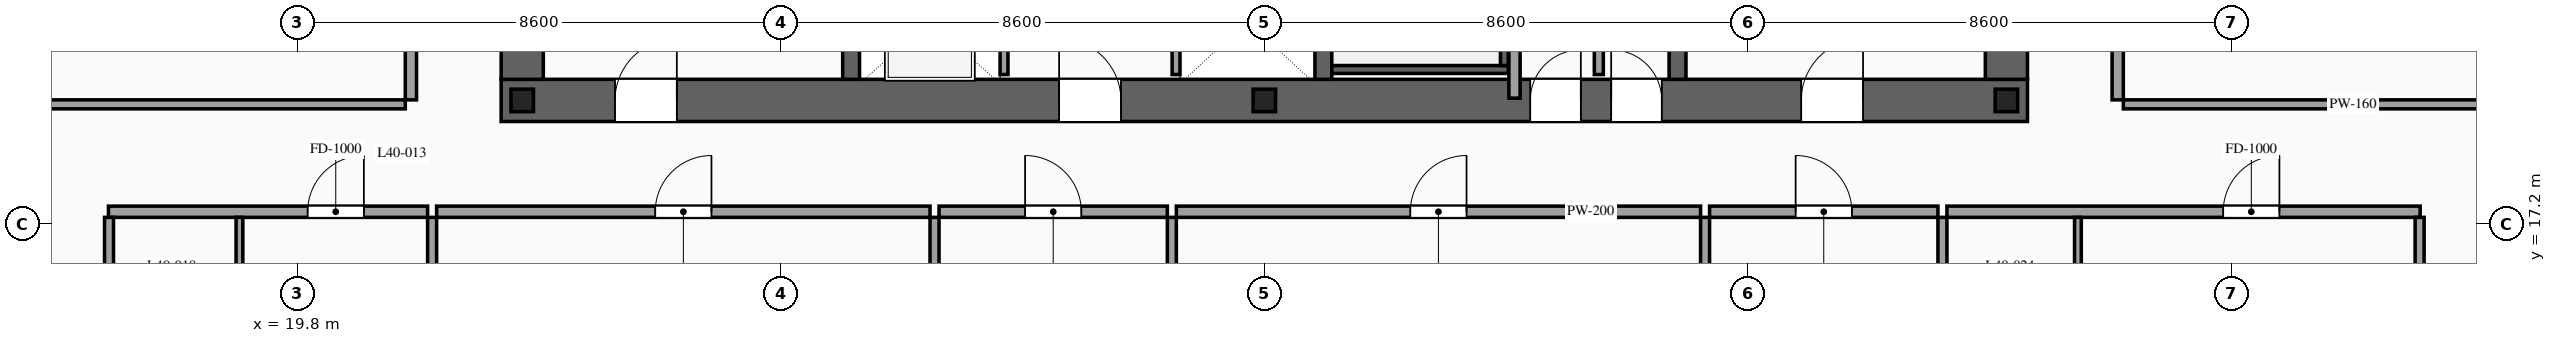
"""IFC4 building model, lengths in metres.
Left out: names, types, materials, properties, quantities, classifications, styles, units other than length and angle.
Written with IfcOpenShell. Run it as: python <this file> out.ifc"""

import sys

from ifc_helpers import new_model, si_unit, direction, frame, frame_2d, origin, origin_2d, place, context, subcontext, project, spatial, rectangle, i_section, extrude, source, transform, mapped, element, fill, save


model = new_model("IFC4")
c1 = context("Model", 3, precision=1e-05, world=origin(), true_north=direction((0.0, 1.0)))
c2 = subcontext(c1, "Body", "Model", "MODEL_VIEW")
j1 = project(units=[si_unit("LENGTHUNIT", "METRE"), si_unit("PLANEANGLEUNIT", "RADIAN")], contexts=[c1])
p1 = place(None, origin())
s1 = spatial("IfcSite", under=j1, at=p1, CompositionType="ELEMENT")
p2 = place(p1, origin())
s2 = spatial("IfcBuilding", under=s1, at=p2, CompositionType="ELEMENT")
p3 = place(p2, frame((0.0, 0.0, 152.4)))
s3 = spatial("IfcBuildingStorey", under=s2, at=p3, CompositionType="ELEMENT", Elevation=152.4)
p4 = place(p3, frame((23.425, 19.4, 0.0), z_axis=(0.0, 0.0, 1.0), x_axis=(1.0, 0.0, 0.0)))
e1 = element("IfcWall", 1, at=p4, inside=s3, PredefinedType="SHEAR", context=c2, shape_type="SweptSolid", body=[
    extrude(rectangle(XDim=27.15, YDim=0.75, at=frame_2d((13.575, 0.0))), origin(), (0.0, 0.0, 1.0), 3.6),
])
p5 = place(p4, frame((2.025, 0.0, 0.0)))
e2 = element("IfcOpeningElement", 2, at=p5, cuts=e1, PredefinedType="OPENING", context=c2, shape_type="SweptSolid", body=[
    extrude(rectangle(XDim=1.1, YDim=2.2, at=frame_2d((0.55, 1.1))), frame((0.0, 0.39, 0.0), z_axis=(0.0, -1.0, 0.0), x_axis=(1.0, 0.0, 0.0)), (0.0, 0.0, 1.0), 0.78),
])
p6 = place(p4, frame((9.925, 0.0, 0.0)))
e3 = element("IfcOpeningElement", 3, at=p6, cuts=e1, PredefinedType="OPENING", context=c2, shape_type="SweptSolid", body=[
    extrude(rectangle(XDim=1.1, YDim=2.2, at=frame_2d((0.55, 1.1))), frame((0.0, 0.39, 0.0), z_axis=(0.0, -1.0, 0.0), x_axis=(1.0, 0.0, 0.0)), (0.0, 0.0, 1.0), 0.78),
])
p7 = place(p4, frame((23.125, 0.0, 0.0)))
e4 = element("IfcOpeningElement", 4, at=p7, cuts=e1, PredefinedType="OPENING", context=c2, shape_type="SweptSolid", body=[
    extrude(rectangle(XDim=1.1, YDim=2.2, at=frame_2d((0.55, 1.1))), frame((0.0, 0.39, 0.0), z_axis=(0.0, -1.0, 0.0), x_axis=(1.0, 0.0, 0.0)), (0.0, 0.0, 1.0), 0.78),
])
p8 = place(p4, frame((19.745, 0.0, 0.0)))
e5 = element("IfcOpeningElement", 5, at=p8, cuts=e1, PredefinedType="OPENING", context=c2, shape_type="SweptSolid", body=[
    extrude(rectangle(XDim=0.9, YDim=2.15, at=frame_2d((0.45, 1.075))), frame((0.0, 0.39, 0.0), z_axis=(0.0, -1.0, 0.0), x_axis=(1.0, 0.0, 0.0)), (0.0, 0.0, 1.0), 0.78),
])
p9 = place(p4, frame((18.305, 0.0, 0.0)))
e6 = element("IfcOpeningElement", 6, at=p9, cuts=e1, PredefinedType="OPENING", context=c2, shape_type="SweptSolid", body=[
    extrude(rectangle(XDim=0.9, YDim=2.15, at=frame_2d((0.45, 1.075))), frame((0.0, 0.39, 0.0), z_axis=(0.0, -1.0, 0.0), x_axis=(1.0, 0.0, 0.0)), (0.0, 0.0, 1.0), 0.78),
])
m1 = source(origin(), c2, "Body", "SweptSolid", [
    extrude(rectangle(XDim=12.05, YDim=0.75, at=frame_2d((6.025, 0.0))), origin(), (0.0, 0.0, 1.0), 3.6),
])
for number, where, z_axis, x_axis in (
    (7, (23.8, 19.775, 0.0), (0.0, 0.0, 1.0), (0.0, 1.0, 0.0)),
    (8, (50.2, 19.775, 0.0), (0.0, 0.0, 1.0), (0.0, 1.0, 0.0)),
):
    element("IfcWall", number, at=place(p3, frame(where, z_axis=z_axis, x_axis=x_axis)), inside=s3, PredefinedType="SHEAR", context=c2, shape_type="MappedRepresentation", body=[
        mapped(m1, transform((0.0, 0.0, 0.0), scale=1.0)),
    ])
m2 = source(origin(), c2, "Body", "SweptSolid", [
    extrude(rectangle(XDim=12.05, YDim=0.3, at=frame_2d((6.025, 0.0))), origin(), (0.0, 0.0, 1.0), 3.6),
])
for number, where, z_axis, x_axis in (
    (9, (29.65, 19.775, 0.0), (0.0, 0.0, 1.0), (0.0, 1.0, 0.0)),
    (10, (38.05, 19.775, 0.0), (0.0, 0.0, 1.0), (0.0, 1.0, 0.0)),
    (11, (44.35, 19.775, 0.0), (0.0, 0.0, 1.0), (0.0, 1.0, 0.0)),
):
    element("IfcWall", number, at=place(p3, frame(where, z_axis=z_axis, x_axis=x_axis)), inside=s3, PredefinedType="SOLIDWALL", context=c2, shape_type="MappedRepresentation", body=[
        mapped(m2, transform((0.0, 0.0, 0.0), scale=1.0)),
    ])
m3 = source(origin(), c2, "Body", "SweptSolid", [
    extrude(i_section(OverallWidth=0.4, OverallDepth=0.4, WebThickness=0.013, FlangeThickness=0.021, at=origin_2d()), origin(), (0.0, 0.0, 1.0), 3.6),
])
for number, where, z_axis, x_axis in (
    (12, (23.8, 19.4, 0.0), (0.0, 0.0, 1.0), (1.0, 0.0, 0.0)),
    (13, (37.0, 19.4, 0.0), (0.0, 0.0, 1.0), (1.0, 0.0, 0.0)),
    (14, (50.2, 19.4, 0.0), (0.0, 0.0, 1.0), (1.0, 0.0, 0.0)),
):
    element("IfcColumn", number, at=place(p3, frame(where, z_axis=z_axis, x_axis=x_axis)), inside=s3, PredefinedType="COLUMN", context=c2, shape_type="MappedRepresentation", body=[
        mapped(m3, transform((0.0, 0.0, 0.0), scale=1.0)),
    ])
p10 = place(p3, frame((32.37, 19.86, 0.0), z_axis=(0.0, 0.0, 1.0), x_axis=(0.0, 1.0, 0.0)))
e15 = element("IfcWall", 15, at=p10, inside=s3, PredefinedType="SOLIDWALL", context=c2, shape_type="SweptSolid", body=[
    extrude(rectangle(XDim=2.04, YDim=0.14, at=frame_2d((1.02, 0.0))), origin(), (0.0, 0.0, 1.0), 3.38),
])
p11 = place(p10, frame((0.47, 0.0, 0.0)))
e16 = element("IfcOpeningElement", 16, at=p11, cuts=e15, PredefinedType="OPENING", context=c2, shape_type="SweptSolid", body=[
    extrude(rectangle(XDim=1.1, YDim=2.2, at=frame_2d((0.55, 1.1))), frame((0.0, 0.085, 0.0), z_axis=(0.0, -1.0, 0.0), x_axis=(1.0, 0.0, 0.0)), (0.0, 0.0, 1.0), 0.17),
])
m4 = source(origin(), c2, "Body", "SweptSolid", [
    extrude(rectangle(XDim=2.04, YDim=0.14, at=frame_2d((1.02, 0.0))), origin(), (0.0, 0.0, 1.0), 3.38),
])
p12 = place(p3, frame((35.43, 19.86, 0.0), z_axis=(0.0, 0.0, 1.0), x_axis=(0.0, 1.0, 0.0)))
e17 = element("IfcWall", 17, at=p12, inside=s3, PredefinedType="SOLIDWALL", context=c2, shape_type="MappedRepresentation", body=[
    mapped(m4, transform((0.0, 0.0, 0.0), scale=1.0)),
])
m5 = source(origin(), c2, "Body", "SweptSolid", [
    extrude(rectangle(XDim=3.14, YDim=0.14, at=frame_2d((1.57, 0.0))), origin(), (0.0, 0.0, 1.0), 3.38),
])
p13 = place(p3, frame((38.2, 19.95, 0.0), z_axis=(0.0, 0.0, 1.0), x_axis=(1.0, 0.0, 0.0)))
e18 = element("IfcWall", 18, at=p13, inside=s3, PredefinedType="SOLIDWALL", context=c2, shape_type="MappedRepresentation", body=[
    mapped(m5, transform((0.0, 0.0, 0.0), scale=1.0)),
])
m6 = source(origin(), c2, "Body", "SweptSolid", [
    extrude(rectangle(XDim=8.94, YDim=0.14, at=frame_2d((4.47, 0.0))), origin(), (0.0, 0.0, 1.0), 3.38),
])
p14 = place(p3, frame((41.27, 20.02, 0.0), z_axis=(0.0, 0.0, 1.0), x_axis=(0.0, 1.0, 0.0)))
e19 = element("IfcWall", 19, at=p14, inside=s3, PredefinedType="SOLIDWALL", context=c2, shape_type="MappedRepresentation", body=[
    mapped(m6, transform((0.0, 0.0, 0.0), scale=1.0)),
])
m7 = source(origin(), c2, "Body", "SweptSolid", [
    extrude(rectangle(XDim=1.34, YDim=0.16, at=frame_2d((0.67, 0.0))), origin(), (0.0, 0.0, 1.0), 3.38),
])
p15 = place(p3, frame((42.95, 19.86, 0.0), z_axis=(0.0, 0.0, 1.0), x_axis=(0.0, 1.0, 0.0)))
e20 = element("IfcWall", 20, at=p15, inside=s3, PredefinedType="PARTITIONING", context=c2, shape_type="MappedRepresentation", body=[
    mapped(m7, transform((0.0, 0.0, 0.0), scale=1.0)),
])
m8 = source(origin(), c2, "Body", "SweptSolid", [
    extrude(rectangle(XDim=12.72, YDim=0.2, at=frame_2d((6.36, 0.0))), origin(), (0.0, 0.0, 1.0), 3.38),
])
p16 = place(p3, frame((41.45, 19.44, 0.0), z_axis=(0.0, 0.0, 1.0), x_axis=(0.0, 1.0, 0.0)))
e21 = element("IfcWall", 21, at=p16, inside=s3, PredefinedType="PARTITIONING", context=c2, shape_type="MappedRepresentation", body=[
    mapped(m8, transform((0.0, 0.0, 0.0), scale=1.0)),
])
p17 = place(p3, frame((16.44, 17.42, 0.0), z_axis=(0.0, 0.0, 1.0), x_axis=(1.0, 0.0, 0.0)))
e22 = element("IfcWall", 22, at=p17, inside=s3, PredefinedType="PARTITIONING", context=c2, shape_type="SweptSolid", body=[
    extrude(rectangle(XDim=5.677, YDim=0.2, at=frame_2d((2.838, 0.0))), origin(), (0.0, 0.0, 1.0), 3.38),
])
p18 = place(p17, frame((3.543, 0.0, 0.0)))
e23 = element("IfcOpeningElement", 23, at=p18, cuts=e22, PredefinedType="OPENING", context=c2, shape_type="SweptSolid", body=[
    extrude(rectangle(XDim=1.0, YDim=2.2, at=frame_2d((0.5, 1.1))), frame((0.0, 0.115, 0.0), z_axis=(0.0, -1.0, 0.0), x_axis=(1.0, 0.0, 0.0)), (0.0, 0.0, 1.0), 0.23),
])
m9 = source(origin(), c2, "Body", "SweptSolid", [
    extrude(rectangle(XDim=14.97, YDim=0.16, at=frame_2d((7.485, 0.0))), origin(), (0.0, 0.0, 1.0), 3.38),
])
p19 = place(p3, frame((22.197, 2.35, 0.0), z_axis=(0.0, 0.0, 1.0), x_axis=(0.0, 1.0, 0.0)))
e24 = element("IfcWall", 24, at=p19, inside=s3, PredefinedType="PARTITIONING", context=c2, shape_type="MappedRepresentation", body=[
    mapped(m9, transform((0.0, 0.0, 0.0), scale=1.0)),
])
m10 = source(origin(), c2, "Body", "SweptSolid", [
    extrude(rectangle(XDim=2.42, YDim=0.12, at=frame_2d((1.21, 0.0))), origin(), (0.0, 0.0, 1.0), 3.38),
])
p20 = place(p3, frame((18.77, 14.9, 0.0), z_axis=(0.0, 0.0, 1.0), x_axis=(0.0, 1.0, 0.0)))
e25 = element("IfcWall", 25, at=p20, inside=s3, PredefinedType="PARTITIONING", context=c2, shape_type="MappedRepresentation", body=[
    mapped(m10, transform((0.0, 0.0, 0.0), scale=1.0)),
])
p21 = place(p3, frame((22.277, 17.42, 0.0), z_axis=(0.0, 0.0, 1.0), x_axis=(1.0, 0.0, 0.0)))
e26 = element("IfcWall", 26, at=p21, inside=s3, PredefinedType="PARTITIONING", context=c2, shape_type="SweptSolid", body=[
    extrude(rectangle(XDim=8.777, YDim=0.2, at=frame_2d((4.388, 0.0))), origin(), (0.0, 0.0, 1.0), 3.38),
])
p22 = place(p21, frame((3.889, 0.0, 0.0)))
e27 = element("IfcOpeningElement", 27, at=p22, cuts=e26, PredefinedType="OPENING", context=c2, shape_type="SweptSolid", body=[
    extrude(rectangle(XDim=1.0, YDim=2.2, at=frame_2d((0.5, 1.1))), frame((0.0, 0.115, 0.0), z_axis=(0.0, -1.0, 0.0), x_axis=(1.0, 0.0, 0.0)), (0.0, 0.0, 1.0), 0.23),
])
p23 = place(p3, frame((31.134, 2.35, 0.0), z_axis=(0.0, 0.0, 1.0), x_axis=(0.0, 1.0, 0.0)))
e28 = element("IfcWall", 28, at=p23, inside=s3, PredefinedType="PARTITIONING", context=c2, shape_type="MappedRepresentation", body=[
    mapped(m9, transform((0.0, 0.0, 0.0), scale=1.0)),
])
p24 = place(p3, frame((31.214, 17.42, 0.0), z_axis=(0.0, 0.0, 1.0), x_axis=(1.0, 0.0, 0.0)))
e29 = element("IfcWall", 29, at=p24, inside=s3, PredefinedType="PARTITIONING", context=c2, shape_type="SweptSolid", body=[
    extrude(rectangle(XDim=4.061, YDim=0.2, at=frame_2d((2.03, 0.0))), origin(), (0.0, 0.0, 1.0), 3.38),
])
p25 = place(p24, frame((1.531, 0.0, 0.0)))
e30 = element("IfcOpeningElement", 30, at=p25, cuts=e29, PredefinedType="OPENING", context=c2, shape_type="SweptSolid", body=[
    extrude(rectangle(XDim=1.0, YDim=2.2, at=frame_2d((0.5, 1.1))), frame((0.0, 0.115, 0.0), z_axis=(0.0, -1.0, 0.0), x_axis=(1.0, 0.0, 0.0)), (0.0, 0.0, 1.0), 0.23),
])
p26 = place(p3, frame((35.355, 2.35, 0.0), z_axis=(0.0, 0.0, 1.0), x_axis=(0.0, 1.0, 0.0)))
e31 = element("IfcWall", 31, at=p26, inside=s3, PredefinedType="PARTITIONING", context=c2, shape_type="MappedRepresentation", body=[
    mapped(m9, transform((0.0, 0.0, 0.0), scale=1.0)),
])
p27 = place(p3, frame((35.435, 17.42, 0.0), z_axis=(0.0, 0.0, 1.0), x_axis=(1.0, 0.0, 0.0)))
e32 = element("IfcWall", 32, at=p27, inside=s3, PredefinedType="PARTITIONING", context=c2, shape_type="SweptSolid", body=[
    extrude(rectangle(XDim=9.325, YDim=0.2, at=frame_2d((4.663, 0.0))), origin(), (0.0, 0.0, 1.0), 3.38),
])
p28 = place(p27, frame((4.162, 0.0, 0.0)))
e33 = element("IfcOpeningElement", 33, at=p28, cuts=e32, PredefinedType="OPENING", context=c2, shape_type="SweptSolid", body=[
    extrude(rectangle(XDim=1.0, YDim=2.2, at=frame_2d((0.5, 1.1))), frame((0.0, 0.115, 0.0), z_axis=(0.0, -1.0, 0.0), x_axis=(1.0, 0.0, 0.0)), (0.0, 0.0, 1.0), 0.23),
])
p29 = place(p3, frame((44.84, 2.35, 0.0), z_axis=(0.0, 0.0, 1.0), x_axis=(0.0, 1.0, 0.0)))
e34 = element("IfcWall", 34, at=p29, inside=s3, PredefinedType="PARTITIONING", context=c2, shape_type="MappedRepresentation", body=[
    mapped(m9, transform((0.0, 0.0, 0.0), scale=1.0)),
])
p30 = place(p3, frame((44.92, 17.42, 0.0), z_axis=(0.0, 0.0, 1.0), x_axis=(1.0, 0.0, 0.0)))
e35 = element("IfcWall", 35, at=p30, inside=s3, PredefinedType="PARTITIONING", context=c2, shape_type="SweptSolid", body=[
    extrude(rectangle(XDim=4.062, YDim=0.2, at=frame_2d((2.031, 0.0))), origin(), (0.0, 0.0, 1.0), 3.38),
])
p31 = place(p30, frame((1.531, 0.0, 0.0)))
e36 = element("IfcOpeningElement", 36, at=p31, cuts=e35, PredefinedType="OPENING", context=c2, shape_type="SweptSolid", body=[
    extrude(rectangle(XDim=1.0, YDim=2.2, at=frame_2d((0.5, 1.1))), frame((0.0, 0.115, 0.0), z_axis=(0.0, -1.0, 0.0), x_axis=(1.0, 0.0, 0.0)), (0.0, 0.0, 1.0), 0.23),
])
p32 = place(p3, frame((49.062, 2.35, 0.0), z_axis=(0.0, 0.0, 1.0), x_axis=(0.0, 1.0, 0.0)))
e37 = element("IfcWall", 37, at=p32, inside=s3, PredefinedType="PARTITIONING", context=c2, shape_type="MappedRepresentation", body=[
    mapped(m9, transform((0.0, 0.0, 0.0), scale=1.0)),
])
p33 = place(p3, frame((49.142, 17.42, 0.0), z_axis=(0.0, 0.0, 1.0), x_axis=(1.0, 0.0, 0.0)))
e38 = element("IfcWall", 38, at=p33, inside=s3, PredefinedType="PARTITIONING", context=c2, shape_type="SweptSolid", body=[
    extrude(rectangle(XDim=8.418, YDim=0.2, at=frame_2d((4.209, 0.0))), origin(), (0.0, 0.0, 1.0), 3.38),
])
p34 = place(p33, frame((4.914, 0.0, 0.0)))
e39 = element("IfcOpeningElement", 39, at=p34, cuts=e38, PredefinedType="OPENING", context=c2, shape_type="SweptSolid", body=[
    extrude(rectangle(XDim=1.0, YDim=2.2, at=frame_2d((0.5, 1.1))), frame((0.0, 0.115, 0.0), z_axis=(0.0, -1.0, 0.0), x_axis=(1.0, 0.0, 0.0)), (0.0, 0.0, 1.0), 0.23),
])
m11 = source(origin(), c2, "Body", "SweptSolid", [
    extrude(rectangle(XDim=14.82, YDim=0.16, at=frame_2d((7.41, 0.0))), origin(), (0.0, 0.0, 1.0), 3.38),
])
for number, where, z_axis, x_axis in (
    (40, (16.45, 2.5, 0.0), (0.0, 0.0, 1.0), (0.0, 1.0, 0.0)),
    (41, (57.55, 2.5, 0.0), (0.0, 0.0, 1.0), (0.0, 1.0, 0.0)),
):
    element("IfcWall", number, at=place(p3, frame(where, z_axis=z_axis, x_axis=x_axis)), inside=s3, PredefinedType="PARTITIONING", context=c2, shape_type="MappedRepresentation", body=[
        mapped(m11, transform((0.0, 0.0, 0.0), scale=1.0)),
    ])
p35 = place(p3, frame((51.472, 14.9, 0.0), z_axis=(0.0, 0.0, 1.0), x_axis=(0.0, 1.0, 0.0)))
e42 = element("IfcWall", 42, at=p35, inside=s3, PredefinedType="PARTITIONING", context=c2, shape_type="MappedRepresentation", body=[
    mapped(m10, transform((0.0, 0.0, 0.0), scale=1.0)),
])
p36 = place(p3, frame((21.82, 19.41, 0.0), z_axis=(0.0, 0.0, 1.0), x_axis=(0.0, 1.0, 0.0)))
e43 = element("IfcWall", 43, at=p36, inside=s3, PredefinedType="PARTITIONING", context=c2, shape_type="SweptSolid", body=[
    extrude(rectangle(XDim=6.31, YDim=0.2, at=frame_2d((3.155, 0.0))), origin(), (0.0, 0.0, 1.0), 3.38),
])
p37 = place(p36, frame((2.655, 0.0, 0.0)))
e44 = element("IfcOpeningElement", 44, at=p37, cuts=e43, PredefinedType="OPENING", context=c2, shape_type="SweptSolid", body=[
    extrude(rectangle(XDim=1.0, YDim=2.2, at=frame_2d((0.5, 1.1))), frame((0.0, 0.115, 0.0), z_axis=(0.0, -1.0, 0.0), x_axis=(1.0, 0.0, 0.0)), (0.0, 0.0, 1.0), 0.23),
])
m12 = source(origin(), c2, "Body", "SweptSolid", [
    extrude(rectangle(XDim=8.17, YDim=0.16, at=frame_2d((4.085, 0.0))), origin(), (0.0, 0.0, 1.0), 2.875),
])
p38 = place(p3, frame((13.55, 19.33, 0.0), z_axis=(0.0, 0.0, 1.0), x_axis=(1.0, 0.0, 0.0)))
e45 = element("IfcWall", 45, at=p38, inside=s3, PredefinedType="PARTITIONING", context=c2, shape_type="MappedRepresentation", body=[
    mapped(m12, transform((0.0, 0.0, 0.0), scale=1.0)),
])
p39 = place(p3, frame((52.18, 19.41, 0.0), z_axis=(0.0, 0.0, 1.0), x_axis=(0.0, 1.0, 0.0)))
e46 = element("IfcWall", 46, at=p39, inside=s3, PredefinedType="PARTITIONING", context=c2, shape_type="SweptSolid", body=[
    extrude(rectangle(XDim=6.31, YDim=0.2, at=frame_2d((3.155, 0.0))), origin(), (0.0, 0.0, 1.0), 3.38),
])
p40 = place(p39, frame((2.655, 0.0, 0.0)))
e47 = element("IfcOpeningElement", 47, at=p40, cuts=e46, PredefinedType="OPENING", context=c2, shape_type="SweptSolid", body=[
    extrude(rectangle(XDim=1.0, YDim=2.2, at=frame_2d((0.5, 1.1))), frame((0.0, 0.115, 0.0), z_axis=(0.0, -1.0, 0.0), x_axis=(1.0, 0.0, 0.0)), (0.0, 0.0, 1.0), 0.23),
])
p41 = place(p3, frame((52.28, 19.33, 0.0), z_axis=(0.0, 0.0, 1.0), x_axis=(1.0, 0.0, 0.0)))
e48 = element("IfcWall", 48, at=p41, inside=s3, PredefinedType="PARTITIONING", context=c2, shape_type="MappedRepresentation", body=[
    mapped(m12, transform((0.0, 0.0, 0.0), scale=1.0)),
])
m13 = source(origin(), c2, "Body", "SweptSolid", [
    extrude(rectangle(XDim=1.1, YDim=2.2, at=frame_2d((0.55, 1.1))), frame((0.0, 0.025, 0.0), z_axis=(0.0, -1.0, 0.0), x_axis=(1.0, 0.0, 0.0)), (0.0, 0.0, 1.0), 0.05),
])
p42 = place(p5, origin())
e49 = element("IfcDoor", 49, at=p42, inside=s3, OperationType="SINGLE_SWING_RIGHT", PredefinedType="DOOR", context=c2, shape_type="MappedRepresentation", body=[
    mapped(m13, transform((0.0, 0.0, 0.0), scale=1.0)),
])
fill(e2, e49)
p43 = place(p6, origin())
e50 = element("IfcDoor", 50, at=p43, inside=s3, OperationType="SINGLE_SWING_LEFT", PredefinedType="DOOR", context=c2, shape_type="MappedRepresentation", body=[
    mapped(m13, transform((0.0, 0.0, 0.0), scale=1.0)),
])
fill(e3, e50)
p44 = place(p7, origin())
e51 = element("IfcDoor", 51, at=p44, inside=s3, OperationType="SINGLE_SWING_RIGHT", PredefinedType="DOOR", context=c2, shape_type="MappedRepresentation", body=[
    mapped(m13, transform((0.0, 0.0, 0.0), scale=1.0)),
])
fill(e4, e51)
m14 = source(origin(), c2, "Body", "SweptSolid", [
    extrude(rectangle(XDim=0.9, YDim=2.15, at=frame_2d((0.45, 1.075))), frame((0.0, 0.025, 0.0), z_axis=(0.0, -1.0, 0.0), x_axis=(1.0, 0.0, 0.0)), (0.0, 0.0, 1.0), 0.05),
])
p45 = place(p8, origin())
e52 = element("IfcDoor", 52, at=p45, inside=s3, OperationType="SINGLE_SWING_LEFT", PredefinedType="DOOR", context=c2, shape_type="MappedRepresentation", body=[
    mapped(m14, transform((0.0, 0.0, 0.0), scale=1.0)),
])
fill(e5, e52)
p46 = place(p9, origin())
e53 = element("IfcDoor", 53, at=p46, inside=s3, OperationType="SINGLE_SWING_RIGHT", PredefinedType="DOOR", context=c2, shape_type="MappedRepresentation", body=[
    mapped(m14, transform((0.0, 0.0, 0.0), scale=1.0)),
])
fill(e6, e53)
m15 = source(origin(), c2, "Body", "SweptSolid", [
    extrude(rectangle(XDim=1.0, YDim=2.2, at=frame_2d((0.5, 1.1))), frame((0.0, 0.025, 0.0), z_axis=(0.0, -1.0, 0.0), x_axis=(1.0, 0.0, 0.0)), (0.0, 0.0, 1.0), 0.05),
])
p47 = place(p18, origin())
e54 = element("IfcDoor", 54, at=p47, inside=s3, OperationType="SINGLE_SWING_RIGHT", PredefinedType="DOOR", context=c2, shape_type="MappedRepresentation", body=[
    mapped(m15, transform((0.0, 0.0, 0.0), scale=1.0)),
])
fill(e23, e54)
p48 = place(p22, origin())
e55 = element("IfcDoor", 55, at=p48, inside=s3, OperationType="SINGLE_SWING_RIGHT", PredefinedType="DOOR", context=c2, shape_type="MappedRepresentation", body=[
    mapped(m15, transform((0.0, 0.0, 0.0), scale=1.0)),
])
fill(e27, e55)
p49 = place(p25, origin())
e56 = element("IfcDoor", 56, at=p49, inside=s3, OperationType="SINGLE_SWING_LEFT", PredefinedType="DOOR", context=c2, shape_type="MappedRepresentation", body=[
    mapped(m15, transform((0.0, 0.0, 0.0), scale=1.0)),
])
fill(e30, e56)
p50 = place(p28, origin())
e57 = element("IfcDoor", 57, at=p50, inside=s3, OperationType="SINGLE_SWING_RIGHT", PredefinedType="DOOR", context=c2, shape_type="MappedRepresentation", body=[
    mapped(m15, transform((0.0, 0.0, 0.0), scale=1.0)),
])
fill(e33, e57)
p51 = place(p31, origin())
e58 = element("IfcDoor", 58, at=p51, inside=s3, OperationType="SINGLE_SWING_LEFT", PredefinedType="DOOR", context=c2, shape_type="MappedRepresentation", body=[
    mapped(m15, transform((0.0, 0.0, 0.0), scale=1.0)),
])
fill(e36, e58)
p52 = place(p34, origin())
e59 = element("IfcDoor", 59, at=p52, inside=s3, OperationType="SINGLE_SWING_RIGHT", PredefinedType="DOOR", context=c2, shape_type="MappedRepresentation", body=[
    mapped(m15, transform((0.0, 0.0, 0.0), scale=1.0)),
])
fill(e39, e59)
save(model, sys.argv[1])
